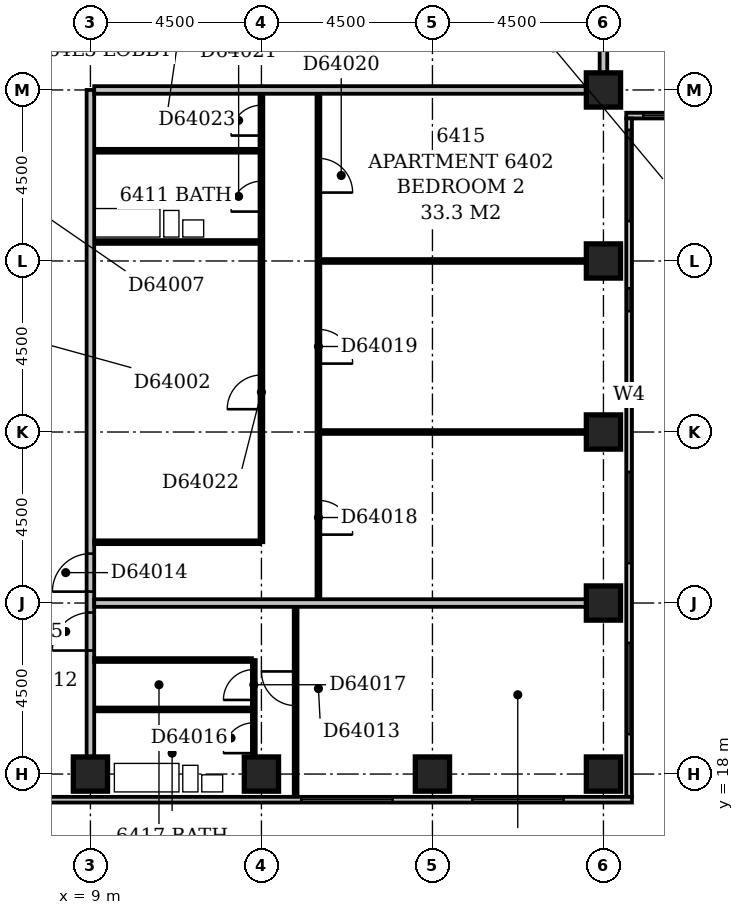
"""IFC4 building model, lengths in metres.
Left out: names, types, materials, properties, quantities, classifications, styles, units other than length and angle.
Written with IfcOpenShell. Run it as: python <this file> out.ifc"""

import sys

from ifc_helpers import new_model, si_unit, direction, frame, frame_2d, origin, origin_2d, place, context, subcontext, project, spatial, rectangle, extrude, element, fill, save


model = new_model("IFC4")
c1 = context("Model", 3, precision=1e-05, world=origin(), true_north=direction((0.0, 1.0)))
c2 = subcontext(c1, "Body", "Model", "MODEL_VIEW")
j1 = project(units=[si_unit("LENGTHUNIT", "METRE"), si_unit("PLANEANGLEUNIT", "RADIAN")], contexts=[c1])
p1 = place(None, origin())
s1 = spatial("IfcSite", under=j1, at=p1, CompositionType="ELEMENT")
p2 = place(p1, origin())
s2 = spatial("IfcBuilding", under=s1, at=p2, CompositionType="ELEMENT")
p3 = place(p2, frame((0.0, 0.0, 247.4)))
s3 = spatial("IfcBuildingStorey", under=s2, at=p3, CompositionType="ELEMENT", Elevation=247.4)
for number, where, z_axis, x_axis in (
    (1, (9.0, 18.0, -0.3), (0.0, 0.0, 1.0), (1.0, 0.0, 0.0)),
    (2, (13.5, 18.0, -0.3), (0.0, 0.0, 1.0), (1.0, 0.0, 0.0)),
    (3, (18.0, 18.0, -0.3), (0.0, 0.0, 1.0), (1.0, 0.0, 0.0)),
    (4, (22.5, 18.0, -0.3), (0.0, 0.0, 1.0), (1.0, 0.0, 0.0)),
    (5, (22.5, 22.5, -0.3), (0.0, 0.0, 1.0), (1.0, 0.0, 0.0)),
    (6, (22.5, 27.0, -0.3), (0.0, 0.0, 1.0), (1.0, 0.0, 0.0)),
    (7, (22.5, 31.5, -0.3), (0.0, 0.0, 1.0), (1.0, 0.0, 0.0)),
    (8, (22.5, 36.0, -0.3), (0.0, 0.0, 1.0), (1.0, 0.0, 0.0)),
):
    element("IfcColumn", number, at=place(p3, frame(where, z_axis=z_axis, x_axis=x_axis)), inside=s3, PredefinedType="COLUMN", context=c2, shape_type="SweptSolid", body=[
        extrude(rectangle(XDim=0.9, YDim=0.9, at=origin_2d()), origin(), (0.0, 0.0, 1.0), 3.6),
    ])
p4 = place(p3, frame((3.9, 17.325, 0.0), z_axis=(0.0, 0.0, 1.0), x_axis=(1.0, 0.0, 0.0)))
e9 = element("IfcWall", 9, at=p4, inside=s3, PredefinedType="STANDARD", context=c2, shape_type="SweptSolid", body=[
    extrude(rectangle(XDim=19.35, YDim=0.15, at=frame_2d((9.675, 0.0))), origin(), (0.0, 0.0, 1.0), 2.7),
])
p5 = place(p4, frame((10.65, 0.0, 0.6)))
e10 = element("IfcOpeningElement", 10, at=p5, cuts=e9, PredefinedType="OPENING", context=c2, shape_type="SweptSolid", body=[
    extrude(rectangle(XDim=2.4, YDim=1.8, at=frame_2d((1.2, 0.9))), frame((0.0, 0.087, 0.0), z_axis=(0.0, -1.0, 0.0), x_axis=(1.0, 0.0, 0.0)), (0.0, 0.0, 1.0), 0.174),
])
p6 = place(p4, frame((15.15, 0.0, 0.6)))
e11 = element("IfcOpeningElement", 11, at=p6, cuts=e9, PredefinedType="OPENING", context=c2, shape_type="SweptSolid", body=[
    extrude(rectangle(XDim=2.4, YDim=1.8, at=frame_2d((1.2, 0.9))), frame((0.0, 0.087, 0.0), z_axis=(0.0, -1.0, 0.0), x_axis=(1.0, 0.0, 0.0)), (0.0, 0.0, 1.0), 0.174),
])
p7 = place(p3, frame((23.175, 17.4, 0.0), z_axis=(0.0, 0.0, 1.0), x_axis=(0.0, 1.0, 0.0)))
e12 = element("IfcWall", 12, at=p7, inside=s3, PredefinedType="STANDARD", context=c2, shape_type="SweptSolid", body=[
    extrude(rectangle(XDim=17.85, YDim=0.15, at=frame_2d((8.925, 0.0))), origin(), (0.0, 0.0, 1.0), 2.7),
])
p8 = place(p7, frame((1.65, 0.0, 0.6)))
e13 = element("IfcOpeningElement", 13, at=p8, cuts=e12, PredefinedType="OPENING", context=c2, shape_type="SweptSolid", body=[
    extrude(rectangle(XDim=2.4, YDim=1.8, at=frame_2d((1.2, 0.9))), frame((0.0, 0.087, 0.0), z_axis=(0.0, -1.0, 0.0), x_axis=(1.0, 0.0, 0.0)), (0.0, 0.0, 1.0), 0.174),
])
p9 = place(p7, frame((6.15, 0.0, 0.6)))
e14 = element("IfcOpeningElement", 14, at=p9, cuts=e12, PredefinedType="OPENING", context=c2, shape_type="SweptSolid", body=[
    extrude(rectangle(XDim=2.4, YDim=1.8, at=frame_2d((1.2, 0.9))), frame((0.0, 0.087, 0.0), z_axis=(0.0, -1.0, 0.0), x_axis=(1.0, 0.0, 0.0)), (0.0, 0.0, 1.0), 0.174),
])
p10 = place(p7, frame((10.273, 0.0, 0.6)))
e15 = element("IfcOpeningElement", 15, at=p10, cuts=e12, PredefinedType="OPENING", context=c2, shape_type="SweptSolid", body=[
    extrude(rectangle(XDim=0.6, YDim=1.8, at=frame_2d((0.3, 0.9))), frame((0.0, 0.087, 0.0), z_axis=(0.0, -1.0, 0.0), x_axis=(1.0, 0.0, 0.0)), (0.0, 0.0, 1.0), 0.174),
])
p11 = place(p7, frame((12.78, 0.0, 0.6)))
e16 = element("IfcOpeningElement", 16, at=p11, cuts=e12, PredefinedType="OPENING", context=c2, shape_type="SweptSolid", body=[
    extrude(rectangle(XDim=0.6, YDim=1.8, at=frame_2d((0.3, 0.9))), frame((0.0, 0.087, 0.0), z_axis=(0.0, -1.0, 0.0), x_axis=(1.0, 0.0, 0.0)), (0.0, 0.0, 1.0), 0.174),
])
p12 = place(p7, frame((15.15, 0.0, 0.6)))
e17 = element("IfcOpeningElement", 17, at=p12, cuts=e12, PredefinedType="OPENING", context=c2, shape_type="SweptSolid", body=[
    extrude(rectangle(XDim=2.4, YDim=1.8, at=frame_2d((1.2, 0.9))), frame((0.0, 0.087, 0.0), z_axis=(0.0, -1.0, 0.0), x_axis=(1.0, 0.0, 0.0)), (0.0, 0.0, 1.0), 0.174),
])
p13 = place(p3, frame((23.1, 35.325, 0.0), z_axis=(0.0, 0.0, 1.0), x_axis=(1.0, 0.0, 0.0)))
e18 = element("IfcWall", 18, at=p13, inside=s3, PredefinedType="STANDARD", context=c2, shape_type="SweptSolid", body=[
    extrude(rectangle(XDim=3.9, YDim=0.15, at=frame_2d((1.95, 0.0))), origin(), (0.0, 0.0, 1.0), 2.7),
])
p14 = place(p13, frame((0.45, 0.0, 0.6)))
e19 = element("IfcOpeningElement", 19, at=p14, cuts=e18, PredefinedType="OPENING", context=c2, shape_type="SweptSolid", body=[
    extrude(rectangle(XDim=2.4, YDim=1.8, at=frame_2d((1.2, 0.9))), frame((0.0, 0.087, 0.0), z_axis=(0.0, -1.0, 0.0), x_axis=(1.0, 0.0, 0.0)), (0.0, 0.0, 1.0), 0.174),
])
p15 = place(p3, frame((14.4, 17.4, 0.0), z_axis=(0.0, 0.0, 1.0), x_axis=(0.0, 1.0, 0.0)))
e20 = element("IfcWall", 20, at=p15, inside=s3, PredefinedType="PARTITIONING", context=c2, shape_type="SweptSolid", body=[
    extrude(rectangle(XDim=5.0, YDim=0.1, at=frame_2d((2.5, 0.0))), origin(), (0.0, 0.0, 1.0), 3.3),
])
p16 = place(p15, frame((2.4, 0.0, 0.0)))
e21 = element("IfcOpeningElement", 21, at=p16, cuts=e20, PredefinedType="OPENING", context=c2, shape_type="SweptSolid", body=[
    extrude(rectangle(XDim=0.9, YDim=2.1, at=frame_2d((0.45, 1.05))), frame((0.0, 0.062, 0.0), z_axis=(0.0, -1.0, 0.0), x_axis=(1.0, 0.0, 0.0)), (0.0, 0.0, 1.0), 0.124),
])
p17 = place(p3, frame((9.0, 18.45, 0.0), z_axis=(0.0, 0.0, 1.0), x_axis=(0.0, 1.0, 0.0)))
e22 = element("IfcWall", 22, at=p17, inside=s3, PredefinedType="PARTITIONING", context=c2, shape_type="SweptSolid", body=[
    extrude(rectangle(XDim=17.55, YDim=0.2, at=frame_2d((8.775, 0.0))), origin(), (0.0, 0.0, 1.0), 3.3),
])
p18 = place(p17, frame((4.35, 0.0, 0.0)))
e23 = element("IfcOpeningElement", 23, at=p18, cuts=e22, PredefinedType="OPENING", context=c2, shape_type="SweptSolid", body=[
    extrude(rectangle(XDim=1.0, YDim=2.1, at=frame_2d((0.5, 1.05))), frame((0.0, 0.112, 0.0), z_axis=(0.0, -1.0, 0.0), x_axis=(1.0, 0.0, 0.0)), (0.0, 0.0, 1.0), 0.224),
])
p19 = place(p17, frame((2.8, 0.0, 0.0)))
e24 = element("IfcOpeningElement", 24, at=p19, cuts=e22, PredefinedType="OPENING", context=c2, shape_type="SweptSolid", body=[
    extrude(rectangle(XDim=1.0, YDim=2.1, at=frame_2d((0.5, 1.05))), frame((0.0, 0.112, 0.0), z_axis=(0.0, -1.0, 0.0), x_axis=(1.0, 0.0, 0.0)), (0.0, 0.0, 1.0), 0.224),
])
p20 = place(p3, frame((13.3, 18.45, 0.0), z_axis=(0.0, 0.0, 1.0), x_axis=(0.0, 1.0, 0.0)))
e25 = element("IfcWall", 25, at=p20, inside=s3, PredefinedType="PARTITIONING", context=c2, shape_type="SweptSolid", body=[
    extrude(rectangle(XDim=2.55, YDim=0.1, at=frame_2d((1.275, 0.0))), origin(), (0.0, 0.0, 1.0), 3.3),
])
p21 = place(p20, frame((0.1, 0.0, 0.0)))
e26 = element("IfcOpeningElement", 26, at=p21, cuts=e25, PredefinedType="OPENING", context=c2, shape_type="SweptSolid", body=[
    extrude(rectangle(XDim=0.8, YDim=2.1, at=frame_2d((0.4, 1.05))), frame((0.0, 0.062, 0.0), z_axis=(0.0, -1.0, 0.0), x_axis=(1.0, 0.0, 0.0)), (0.0, 0.0, 1.0), 0.124),
])
p22 = place(p20, frame((1.5, 0.0, 0.0)))
e27 = element("IfcOpeningElement", 27, at=p22, cuts=e25, PredefinedType="OPENING", context=c2, shape_type="SweptSolid", body=[
    extrude(rectangle(XDim=0.8, YDim=2.1, at=frame_2d((0.4, 1.05))), frame((0.0, 0.062, 0.0), z_axis=(0.0, -1.0, 0.0), x_axis=(1.0, 0.0, 0.0)), (0.0, 0.0, 1.0), 0.124),
])
p23 = place(p3, frame((9.1, 19.7, 0.0), z_axis=(0.0, 0.0, 1.0), x_axis=(1.0, 0.0, 0.0)))
e28 = element("IfcWall", 28, at=p23, inside=s3, PredefinedType="PLUMBINGWALL", context=c2, shape_type="SweptSolid", body=[
    extrude(rectangle(XDim=4.15, YDim=0.1, at=frame_2d((2.075, 0.0))), origin(), (0.0, 0.0, 1.0), 3.3),
])
p24 = place(p3, frame((9.1, 21.0, 0.0), z_axis=(0.0, 0.0, 1.0), x_axis=(1.0, 0.0, 0.0)))
e29 = element("IfcWall", 29, at=p24, inside=s3, PredefinedType="PARTITIONING", context=c2, shape_type="SweptSolid", body=[
    extrude(rectangle(XDim=4.15, YDim=0.1, at=frame_2d((2.075, 0.0))), origin(), (0.0, 0.0, 1.0), 3.3),
])
p25 = place(p3, frame((9.1, 22.5, 0.0), z_axis=(0.0, 0.0, 1.0), x_axis=(1.0, 0.0, 0.0)))
e30 = element("IfcWall", 30, at=p25, inside=s3, PredefinedType="PARTITIONING", context=c2, shape_type="SweptSolid", body=[
    extrude(rectangle(XDim=12.95, YDim=0.2, at=frame_2d((6.475, 0.0))), origin(), (0.0, 0.0, 1.0), 3.3),
])
p26 = place(p3, frame((15.0, 22.6, 0.0), z_axis=(0.0, 0.0, 1.0), x_axis=(0.0, 1.0, 0.0)))
e31 = element("IfcWall", 31, at=p26, inside=s3, PredefinedType="PARTITIONING", context=c2, shape_type="SweptSolid", body=[
    extrude(rectangle(XDim=13.3, YDim=0.1, at=frame_2d((6.65, 0.0))), origin(), (0.0, 0.0, 1.0), 3.3),
])
p27 = place(p26, frame((1.7, 0.0, 0.0)))
e32 = element("IfcOpeningElement", 32, at=p27, cuts=e31, PredefinedType="OPENING", context=c2, shape_type="SweptSolid", body=[
    extrude(rectangle(XDim=0.9, YDim=2.1, at=frame_2d((0.45, 1.05))), frame((0.0, 0.062, 0.0), z_axis=(0.0, -1.0, 0.0), x_axis=(1.0, 0.0, 0.0)), (0.0, 0.0, 1.0), 0.124),
])
p28 = place(p26, frame((6.2, 0.0, 0.0)))
e33 = element("IfcOpeningElement", 33, at=p28, cuts=e31, PredefinedType="OPENING", context=c2, shape_type="SweptSolid", body=[
    extrude(rectangle(XDim=0.9, YDim=2.1, at=frame_2d((0.45, 1.05))), frame((0.0, 0.062, 0.0), z_axis=(0.0, -1.0, 0.0), x_axis=(1.0, 0.0, 0.0)), (0.0, 0.0, 1.0), 0.124),
])
p29 = place(p26, frame((10.7, 0.0, 0.0)))
e34 = element("IfcOpeningElement", 34, at=p29, cuts=e31, PredefinedType="OPENING", context=c2, shape_type="SweptSolid", body=[
    extrude(rectangle(XDim=0.9, YDim=2.1, at=frame_2d((0.45, 1.05))), frame((0.0, 0.062, 0.0), z_axis=(0.0, -1.0, 0.0), x_axis=(1.0, 0.0, 0.0)), (0.0, 0.0, 1.0), 0.124),
])
p30 = place(p3, frame((9.1, 24.1, 0.0), z_axis=(0.0, 0.0, 1.0), x_axis=(1.0, 0.0, 0.0)))
e35 = element("IfcWall", 35, at=p30, inside=s3, PredefinedType="PARTITIONING", context=c2, shape_type="SweptSolid", body=[
    extrude(rectangle(XDim=4.35, YDim=0.1, at=frame_2d((2.175, 0.0))), origin(), (0.0, 0.0, 1.0), 3.3),
])
p31 = place(p3, frame((13.5, 24.1, 0.0), z_axis=(0.0, 0.0, 1.0), x_axis=(0.0, 1.0, 0.0)))
e36 = element("IfcWall", 36, at=p31, inside=s3, PredefinedType="PARTITIONING", context=c2, shape_type="SweptSolid", body=[
    extrude(rectangle(XDim=11.8, YDim=0.1, at=frame_2d((5.9, 0.0))), origin(), (0.0, 0.0, 1.0), 3.3),
])
p32 = place(p31, frame((8.7, 0.0, 0.0)))
e37 = element("IfcOpeningElement", 37, at=p32, cuts=e36, PredefinedType="OPENING", context=c2, shape_type="SweptSolid", body=[
    extrude(rectangle(XDim=0.8, YDim=2.1, at=frame_2d((0.4, 1.05))), frame((0.0, 0.062, 0.0), z_axis=(0.0, -1.0, 0.0), x_axis=(1.0, 0.0, 0.0)), (0.0, 0.0, 1.0), 0.124),
])
p33 = place(p31, frame((3.5, 0.0, 0.0)))
e38 = element("IfcOpeningElement", 38, at=p33, cuts=e36, PredefinedType="OPENING", context=c2, shape_type="SweptSolid", body=[
    extrude(rectangle(XDim=0.9, YDim=2.1, at=frame_2d((0.45, 1.05))), frame((0.0, 0.062, 0.0), z_axis=(0.0, -1.0, 0.0), x_axis=(1.0, 0.0, 0.0)), (0.0, 0.0, 1.0), 0.124),
])
p34 = place(p31, frame((10.7, 0.0, 0.0)))
e39 = element("IfcOpeningElement", 39, at=p34, cuts=e36, PredefinedType="OPENING", context=c2, shape_type="SweptSolid", body=[
    extrude(rectangle(XDim=0.8, YDim=2.1, at=frame_2d((0.4, 1.05))), frame((0.0, 0.062, 0.0), z_axis=(0.0, -1.0, 0.0), x_axis=(1.0, 0.0, 0.0)), (0.0, 0.0, 1.0), 0.124),
])
p35 = place(p3, frame((15.05, 27.0, 0.0), z_axis=(0.0, 0.0, 1.0), x_axis=(1.0, 0.0, 0.0)))
e40 = element("IfcWall", 40, at=p35, inside=s3, PredefinedType="PARTITIONING", context=c2, shape_type="SweptSolid", body=[
    extrude(rectangle(XDim=7.0, YDim=0.1, at=frame_2d((3.5, 0.0))), origin(), (0.0, 0.0, 1.0), 2.7),
])
p36 = place(p3, frame((15.05, 31.5, 0.0), z_axis=(0.0, 0.0, 1.0), x_axis=(1.0, 0.0, 0.0)))
e41 = element("IfcWall", 41, at=p36, inside=s3, PredefinedType="PARTITIONING", context=c2, shape_type="SweptSolid", body=[
    extrude(rectangle(XDim=7.0, YDim=0.1, at=frame_2d((3.5, 0.0))), origin(), (0.0, 0.0, 1.0), 3.3),
])
for number, where, z_axis, x_axis in (
    (42, (9.1, 32.0, 0.0), (0.0, 0.0, 1.0), (1.0, 0.0, 0.0)),
    (43, (9.1, 34.4, 0.0), (0.0, 0.0, 1.0), (1.0, 0.0, 0.0)),
):
    element("IfcWall", number, at=place(p3, frame(where, z_axis=z_axis, x_axis=x_axis)), inside=s3, PredefinedType="PLUMBINGWALL", context=c2, shape_type="SweptSolid", body=[
        extrude(rectangle(XDim=4.35, YDim=0.1, at=frame_2d((2.175, 0.0))), origin(), (0.0, 0.0, 1.0), 3.3),
    ])
p37 = place(p3, frame((9.1, 36.0, 0.0), z_axis=(0.0, 0.0, 1.0), x_axis=(1.0, 0.0, 0.0)))
e44 = element("IfcWall", 44, at=p37, inside=s3, PredefinedType="PARTITIONING", context=c2, shape_type="SweptSolid", body=[
    extrude(rectangle(XDim=12.95, YDim=0.2, at=frame_2d((6.475, 0.0))), origin(), (0.0, 0.0, 1.0), 3.3),
])
p38 = place(p3, frame((22.5, 36.45, 0.0), z_axis=(0.0, 0.0, 1.0), x_axis=(0.0, 1.0, 0.0)))
e45 = element("IfcWall", 45, at=p38, inside=s3, PredefinedType="PARTITIONING", context=c2, shape_type="SweptSolid", body=[
    extrude(rectangle(XDim=13.05, YDim=0.2, at=frame_2d((6.525, 0.0))), origin(), (0.0, 0.0, 1.0), 3.3),
])
p39 = place(p5, origin())
e46 = element("IfcWindow", 46, at=p39, inside=s3, PartitioningType="SINGLE_PANEL", PredefinedType="WINDOW", context=c2, shape_type="SweptSolid", body=[
    extrude(rectangle(XDim=2.4, YDim=1.8, at=frame_2d((1.2, 0.9))), frame((0.0, 0.03, 0.0), z_axis=(0.0, -1.0, 0.0), x_axis=(1.0, 0.0, 0.0)), (0.0, 0.0, 1.0), 0.06),
])
fill(e10, e46)
p40 = place(p6, origin())
e47 = element("IfcWindow", 47, at=p40, inside=s3, PartitioningType="SINGLE_PANEL", PredefinedType="WINDOW", context=c2, shape_type="SweptSolid", body=[
    extrude(rectangle(XDim=2.4, YDim=1.8, at=frame_2d((1.2, 0.9))), frame((0.0, 0.03, 0.0), z_axis=(0.0, -1.0, 0.0), x_axis=(1.0, 0.0, 0.0)), (0.0, 0.0, 1.0), 0.06),
])
fill(e11, e47)
p41 = place(p8, origin())
e48 = element("IfcWindow", 48, at=p41, inside=s3, PartitioningType="SINGLE_PANEL", PredefinedType="WINDOW", context=c2, shape_type="SweptSolid", body=[
    extrude(rectangle(XDim=2.4, YDim=1.8, at=frame_2d((1.2, 0.9))), frame((0.0, 0.03, 0.0), z_axis=(0.0, -1.0, 0.0), x_axis=(1.0, 0.0, 0.0)), (0.0, 0.0, 1.0), 0.06),
])
fill(e13, e48)
p42 = place(p9, origin())
e49 = element("IfcWindow", 49, at=p42, inside=s3, PartitioningType="SINGLE_PANEL", PredefinedType="WINDOW", context=c2, shape_type="SweptSolid", body=[
    extrude(rectangle(XDim=2.4, YDim=1.8, at=frame_2d((1.2, 0.9))), frame((0.0, 0.03, 0.0), z_axis=(0.0, -1.0, 0.0), x_axis=(1.0, 0.0, 0.0)), (0.0, 0.0, 1.0), 0.06),
])
fill(e14, e49)
p43 = place(p10, origin())
e50 = element("IfcWindow", 50, at=p43, inside=s3, PartitioningType="SINGLE_PANEL", PredefinedType="WINDOW", context=c2, shape_type="SweptSolid", body=[
    extrude(rectangle(XDim=0.6, YDim=1.8, at=frame_2d((0.3, 0.9))), frame((0.0, 0.03, 0.0), z_axis=(0.0, -1.0, 0.0), x_axis=(1.0, 0.0, 0.0)), (0.0, 0.0, 1.0), 0.06),
])
fill(e15, e50)
p44 = place(p11, origin())
e51 = element("IfcWindow", 51, at=p44, inside=s3, PartitioningType="SINGLE_PANEL", PredefinedType="WINDOW", context=c2, shape_type="SweptSolid", body=[
    extrude(rectangle(XDim=0.6, YDim=1.8, at=frame_2d((0.3, 0.9))), frame((0.0, 0.03, 0.0), z_axis=(0.0, -1.0, 0.0), x_axis=(1.0, 0.0, 0.0)), (0.0, 0.0, 1.0), 0.06),
])
fill(e16, e51)
p45 = place(p12, origin())
e52 = element("IfcWindow", 52, at=p45, inside=s3, PartitioningType="SINGLE_PANEL", PredefinedType="WINDOW", context=c2, shape_type="SweptSolid", body=[
    extrude(rectangle(XDim=2.4, YDim=1.8, at=frame_2d((1.2, 0.9))), frame((0.0, 0.03, 0.0), z_axis=(0.0, -1.0, 0.0), x_axis=(1.0, 0.0, 0.0)), (0.0, 0.0, 1.0), 0.06),
])
fill(e17, e52)
p46 = place(p14, origin())
e53 = element("IfcWindow", 53, at=p46, inside=s3, PartitioningType="SINGLE_PANEL", PredefinedType="WINDOW", context=c2, shape_type="SweptSolid", body=[
    extrude(rectangle(XDim=2.4, YDim=1.8, at=frame_2d((1.2, 0.9))), frame((0.0, 0.03, 0.0), z_axis=(0.0, -1.0, 0.0), x_axis=(1.0, 0.0, 0.0)), (0.0, 0.0, 1.0), 0.06),
])
fill(e19, e53)
p47 = place(p16, frame((0.9, 0.0, 0.0), z_axis=(0.0, 0.0, 1.0), x_axis=(-1.0, 0.0, 0.0)))
e54 = element("IfcDoor", 54, at=p47, inside=s3, OperationType="SINGLE_SWING_LEFT", PredefinedType="DOOR", context=c2, shape_type="SweptSolid", body=[
    extrude(rectangle(XDim=0.9, YDim=2.1, at=frame_2d((0.45, 1.05))), frame((0.0, 0.025, 0.0), z_axis=(0.0, -1.0, 0.0), x_axis=(1.0, 0.0, 0.0)), (0.0, 0.0, 1.0), 0.05),
])
fill(e21, e54)
p48 = place(p18, origin())
e55 = element("IfcDoor", 55, at=p48, inside=s3, OperationType="SINGLE_SWING_LEFT", PredefinedType="DOOR", context=c2, shape_type="SweptSolid", body=[
    extrude(rectangle(XDim=1.0, YDim=2.1, at=frame_2d((0.5, 1.05))), frame((0.0, 0.025, 0.0), z_axis=(0.0, -1.0, 0.0), x_axis=(1.0, 0.0, 0.0)), (0.0, 0.0, 1.0), 0.05),
])
fill(e23, e55)
p49 = place(p19, origin())
e56 = element("IfcDoor", 56, at=p49, inside=s3, OperationType="SINGLE_SWING_LEFT", PredefinedType="DOOR", context=c2, shape_type="SweptSolid", body=[
    extrude(rectangle(XDim=1.0, YDim=2.1, at=frame_2d((0.5, 1.05))), frame((0.0, 0.025, 0.0), z_axis=(0.0, -1.0, 0.0), x_axis=(1.0, 0.0, 0.0)), (0.0, 0.0, 1.0), 0.05),
])
fill(e24, e56)
p50 = place(p21, origin())
e57 = element("IfcDoor", 57, at=p50, inside=s3, OperationType="SINGLE_SWING_LEFT", PredefinedType="DOOR", context=c2, shape_type="SweptSolid", body=[
    extrude(rectangle(XDim=0.8, YDim=2.1, at=frame_2d((0.4, 1.05))), frame((0.0, 0.025, 0.0), z_axis=(0.0, -1.0, 0.0), x_axis=(1.0, 0.0, 0.0)), (0.0, 0.0, 1.0), 0.05),
])
fill(e26, e57)
p51 = place(p22, origin())
e58 = element("IfcDoor", 58, at=p51, inside=s3, OperationType="SINGLE_SWING_LEFT", PredefinedType="DOOR", context=c2, shape_type="SweptSolid", body=[
    extrude(rectangle(XDim=0.8, YDim=2.1, at=frame_2d((0.4, 1.05))), frame((0.0, 0.025, 0.0), z_axis=(0.0, -1.0, 0.0), x_axis=(1.0, 0.0, 0.0)), (0.0, 0.0, 1.0), 0.05),
])
fill(e27, e58)
p52 = place(p27, frame((0.9, 0.0, 0.0), z_axis=(0.0, 0.0, 1.0), x_axis=(-1.0, 0.0, 0.0)))
e59 = element("IfcDoor", 59, at=p52, inside=s3, OperationType="SINGLE_SWING_RIGHT", PredefinedType="DOOR", context=c2, shape_type="SweptSolid", body=[
    extrude(rectangle(XDim=0.9, YDim=2.1, at=frame_2d((0.45, 1.05))), frame((0.0, 0.025, 0.0), z_axis=(0.0, -1.0, 0.0), x_axis=(1.0, 0.0, 0.0)), (0.0, 0.0, 1.0), 0.05),
])
fill(e32, e59)
p53 = place(p28, frame((0.9, 0.0, 0.0), z_axis=(0.0, 0.0, 1.0), x_axis=(-1.0, 0.0, 0.0)))
e60 = element("IfcDoor", 60, at=p53, inside=s3, OperationType="SINGLE_SWING_RIGHT", PredefinedType="DOOR", context=c2, shape_type="SweptSolid", body=[
    extrude(rectangle(XDim=0.9, YDim=2.1, at=frame_2d((0.45, 1.05))), frame((0.0, 0.025, 0.0), z_axis=(0.0, -1.0, 0.0), x_axis=(1.0, 0.0, 0.0)), (0.0, 0.0, 1.0), 0.05),
])
fill(e33, e60)
p54 = place(p29, frame((0.9, 0.0, 0.0), z_axis=(0.0, 0.0, 1.0), x_axis=(-1.0, 0.0, 0.0)))
e61 = element("IfcDoor", 61, at=p54, inside=s3, OperationType="SINGLE_SWING_RIGHT", PredefinedType="DOOR", context=c2, shape_type="SweptSolid", body=[
    extrude(rectangle(XDim=0.9, YDim=2.1, at=frame_2d((0.45, 1.05))), frame((0.0, 0.025, 0.0), z_axis=(0.0, -1.0, 0.0), x_axis=(1.0, 0.0, 0.0)), (0.0, 0.0, 1.0), 0.05),
])
fill(e34, e61)
p55 = place(p32, origin())
e62 = element("IfcDoor", 62, at=p55, inside=s3, OperationType="SINGLE_SWING_LEFT", PredefinedType="DOOR", context=c2, shape_type="SweptSolid", body=[
    extrude(rectangle(XDim=0.8, YDim=2.1, at=frame_2d((0.4, 1.05))), frame((0.0, 0.025, 0.0), z_axis=(0.0, -1.0, 0.0), x_axis=(1.0, 0.0, 0.0)), (0.0, 0.0, 1.0), 0.05),
])
fill(e37, e62)
p56 = place(p33, origin())
e63 = element("IfcDoor", 63, at=p56, inside=s3, OperationType="SINGLE_SWING_LEFT", PredefinedType="DOOR", context=c2, shape_type="SweptSolid", body=[
    extrude(rectangle(XDim=0.9, YDim=2.1, at=frame_2d((0.45, 1.05))), frame((0.0, 0.025, 0.0), z_axis=(0.0, -1.0, 0.0), x_axis=(1.0, 0.0, 0.0)), (0.0, 0.0, 1.0), 0.05),
])
fill(e38, e63)
p57 = place(p34, origin())
e64 = element("IfcDoor", 64, at=p57, inside=s3, OperationType="SINGLE_SWING_LEFT", PredefinedType="DOOR", context=c2, shape_type="SweptSolid", body=[
    extrude(rectangle(XDim=0.8, YDim=2.1, at=frame_2d((0.4, 1.05))), frame((0.0, 0.025, 0.0), z_axis=(0.0, -1.0, 0.0), x_axis=(1.0, 0.0, 0.0)), (0.0, 0.0, 1.0), 0.05),
])
fill(e39, e64)
save(model, sys.argv[1])
